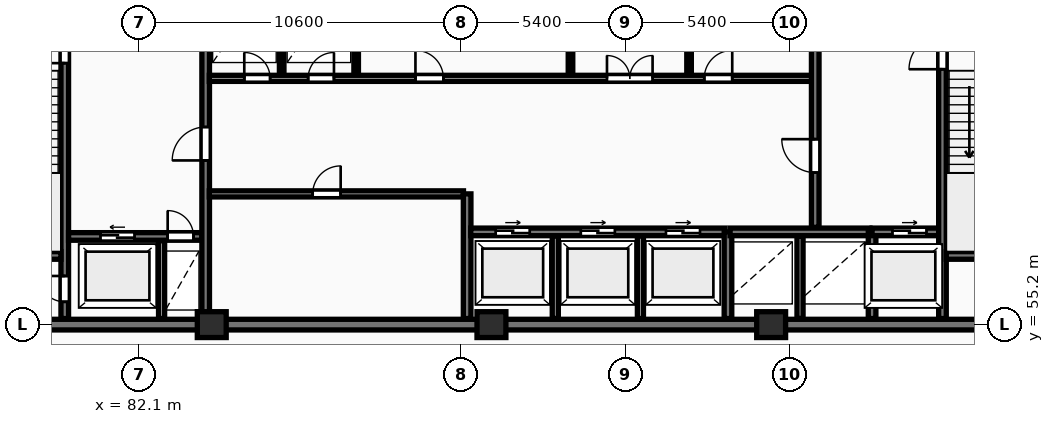
"""IFC4 building model, lengths in metres.
Left out: names, types, materials, properties, quantities, classifications, styles, units other than length and angle.
Written with IfcOpenShell. Run it as: python <this file> out.ifc"""

import sys

from ifc_helpers import new_model, si_unit, direction, frame, frame_2d, origin, origin_2d, place, context, subcontext, project, spatial, rectangle, extrude, element, fill, save


model = new_model("IFC4")
c1 = context("Model", 3, precision=1e-05, world=origin(), true_north=direction((0.0, 1.0)))
c2 = subcontext(c1, "Body", "Model", "MODEL_VIEW")
j1 = project(units=[si_unit("LENGTHUNIT", "METRE"), si_unit("PLANEANGLEUNIT", "RADIAN")], contexts=[c1])
p1 = place(None, origin())
s1 = spatial("IfcSite", under=j1, at=p1, CompositionType="ELEMENT")
p2 = place(p1, origin())
s2 = spatial("IfcBuilding", under=s1, at=p2, CompositionType="ELEMENT")
p3 = place(p2, frame((0.0, 0.0, 157.3)))
s3 = spatial("IfcBuildingStorey", under=s2, at=p3, CompositionType="ELEMENT", Elevation=157.3)
for number, where, z_axis, x_axis in (
    (1, (84.5, 55.2, 0.0), (0.0, 0.0, 1.0), (1.0, 0.0, 0.0)),
    (2, (93.7, 55.2, 0.0), (0.0, 0.0, 1.0), (1.0, 0.0, 0.0)),
    (3, (102.9, 55.2, 0.0), (0.0, 0.0, 1.0), (1.0, 0.0, 0.0)),
):
    element("IfcColumn", number, at=place(p3, frame(where, z_axis=z_axis, x_axis=x_axis)), inside=s3, PredefinedType="COLUMN", context=c2, shape_type="SweptSolid", body=[
        extrude(rectangle(XDim=0.95, YDim=0.85, at=origin_2d()), origin(), (0.0, 0.0, 1.0), 4.8),
    ])
p4 = place(p3, frame((75.95, 55.2, 0.0), z_axis=(0.0, 0.0, 1.0), x_axis=(1.0, 0.0, 0.0)))
e4 = element("IfcWall", 4, at=p4, inside=s3, PredefinedType="SHEAR", context=c2, shape_type="SweptSolid", body=[
    extrude(rectangle(XDim=36.3, YDim=0.35, at=frame_2d((18.15, 0.0))), origin(), (0.0, 0.0, 1.0), 4.8),
])
p5 = place(p3, frame((79.665, 55.4, 0.0), z_axis=(0.0, 0.0, 1.0), x_axis=(0.0, 1.0, 0.0)))
e5 = element("IfcWall", 5, at=p5, inside=s3, PredefinedType="SHEAR", context=c2, shape_type="SweptSolid", body=[
    extrude(rectangle(XDim=11.6, YDim=0.25, at=frame_2d((5.8, 0.0))), origin(), (0.0, 0.0, 1.0), 4.8),
])
p6 = place(p5, frame((0.55, 0.0, 0.0)))
e6 = element("IfcOpeningElement", 6, at=p6, cuts=e5, PredefinedType="OPENING", context=c2, shape_type="SweptSolid", body=[
    extrude(rectangle(XDim=0.85, YDim=2.05, at=frame_2d((0.425, 1.025))), frame((0.0, 0.135, 0.0), z_axis=(0.0, -1.0, 0.0), x_axis=(1.0, 0.0, 0.0)), (0.0, 0.0, 1.0), 0.27),
])
p7 = place(p5, frame((8.4, 0.0, 0.0)))
e7 = element("IfcOpeningElement", 7, at=p7, cuts=e5, PredefinedType="OPENING", context=c2, shape_type="SweptSolid", body=[
    extrude(rectangle(XDim=1.1, YDim=2.1, at=frame_2d((0.55, 1.05))), frame((0.0, 0.135, 0.0), z_axis=(0.0, -1.0, 0.0), x_axis=(1.0, 0.0, 0.0)), (0.0, 0.0, 1.0), 0.27),
])
p8 = place(p5, frame((10.25, 0.0, 0.0)))
e8 = element("IfcOpeningElement", 8, at=p8, cuts=e5, PredefinedType="OPENING", context=c2, shape_type="SweptSolid", body=[
    extrude(rectangle(XDim=0.85, YDim=2.05, at=frame_2d((0.425, 1.025))), frame((0.0, 0.135, 0.0), z_axis=(0.0, -1.0, 0.0), x_axis=(1.0, 0.0, 0.0)), (0.0, 0.0, 1.0), 0.27),
])
p9 = place(p3, frame((76.3, 57.475, 0.0), z_axis=(0.0, 0.0, 1.0), x_axis=(1.0, 0.0, 0.0)))
e9 = element("IfcWall", 9, at=p9, inside=s3, PredefinedType="SHEAR", context=c2, shape_type="SweptSolid", body=[
    extrude(rectangle(XDim=3.24, YDim=0.25, at=frame_2d((1.62, 0.0))), origin(), (0.0, 0.0, 1.0), 4.8),
])
p10 = place(p3, frame((79.79, 58.1, 0.0), z_axis=(0.0, 0.0, 1.0), x_axis=(1.0, 0.0, 0.0)))
e10 = element("IfcWall", 10, at=p10, inside=s3, PredefinedType="SHEAR", context=c2, shape_type="SweptSolid", body=[
    extrude(rectangle(XDim=4.39, YDim=0.25, at=frame_2d((2.195, 0.0))), origin(), (0.0, 0.0, 1.0), 4.8),
])
p11 = place(p10, frame((1.05, 0.0, 0.0)))
e11 = element("IfcOpeningElement", 11, at=p11, cuts=e10, PredefinedType="OPENING", context=c2, shape_type="SweptSolid", body=[
    extrude(rectangle(XDim=1.12, YDim=2.12, at=frame_2d((0.56, 1.06))), frame((0.0, 0.135, 0.0), z_axis=(0.0, -1.0, 0.0), x_axis=(1.0, 0.0, 0.0)), (0.0, 0.0, 1.0), 0.27),
])
p12 = place(p10, frame((3.26, 0.0, 0.0)))
e12 = element("IfcOpeningElement", 12, at=p12, cuts=e10, PredefinedType="OPENING", context=c2, shape_type="SweptSolid", body=[
    extrude(rectangle(XDim=0.85, YDim=2.05, at=frame_2d((0.425, 1.025))), frame((0.0, 0.135, 0.0), z_axis=(0.0, -1.0, 0.0), x_axis=(1.0, 0.0, 0.0)), (0.0, 0.0, 1.0), 0.27),
])
p13 = place(p3, frame((82.85, 55.4, 0.0), z_axis=(0.0, 0.0, 1.0), x_axis=(0.0, 1.0, 0.0)))
e13 = element("IfcWall", 13, at=p13, inside=s3, PredefinedType="PARTITIONING", context=c2, shape_type="SweptSolid", body=[
    extrude(rectangle(XDim=2.56, YDim=0.2, at=frame_2d((1.28, 0.0))), origin(), (0.0, 0.0, 1.0), 4.48),
])
p14 = place(p3, frame((84.3, 55.4, 0.0), z_axis=(0.0, 0.0, 1.0), x_axis=(0.0, 1.0, 0.0)))
e14 = element("IfcWall", 14, at=p14, inside=s3, PredefinedType="SHEAR", context=c2, shape_type="SweptSolid", body=[
    extrude(rectangle(XDim=11.6, YDim=0.25, at=frame_2d((5.8, 0.0))), origin(), (0.0, 0.0, 1.0), 4.8),
])
p15 = place(p14, frame((5.2, 0.0, 0.0)))
e15 = element("IfcOpeningElement", 15, at=p15, cuts=e14, PredefinedType="OPENING", context=c2, shape_type="SweptSolid", body=[
    extrude(rectangle(XDim=1.1, YDim=2.1, at=frame_2d((0.55, 1.05))), frame((0.0, 0.135, 0.0), z_axis=(0.0, -1.0, 0.0), x_axis=(1.0, 0.0, 0.0)), (0.0, 0.0, 1.0), 0.27),
])
p16 = place(p3, frame((84.42, 59.5, 0.0), z_axis=(0.0, 0.0, 1.0), x_axis=(1.0, 0.0, 0.0)))
e16 = element("IfcWall", 16, at=p16, inside=s3, PredefinedType="PARTITIONING", context=c2, shape_type="SweptSolid", body=[
    extrude(rectangle(XDim=8.36, YDim=0.2, at=frame_2d((4.18, 0.0))), origin(), (0.0, 0.0, 1.0), 4.48),
])
p17 = place(p16, frame((3.4, 0.0, 0.0)))
e17 = element("IfcOpeningElement", 17, at=p17, cuts=e16, PredefinedType="OPENING", context=c2, shape_type="SweptSolid", body=[
    extrude(rectangle(XDim=0.92, YDim=2.08, at=frame_2d((0.46, 1.04))), frame((0.0, 0.11, 0.0), z_axis=(0.0, -1.0, 0.0), x_axis=(1.0, 0.0, 0.0)), (0.0, 0.0, 1.0), 0.22),
])
p18 = place(p3, frame((92.9, 55.4, 0.0), z_axis=(0.0, 0.0, 1.0), x_axis=(0.0, 1.0, 0.0)))
e18 = element("IfcWall", 18, at=p18, inside=s3, PredefinedType="SHEAR", context=c2, shape_type="SweptSolid", body=[
    extrude(rectangle(XDim=4.1, YDim=0.25, at=frame_2d((2.05, 0.0))), origin(), (0.0, 0.0, 1.0), 4.8),
])
for number, where, z_axis, x_axis in (
    (19, (95.8, 55.4, 0.0), (0.0, 0.0, 1.0), (0.0, 1.0, 0.0)),
    (20, (98.6, 55.4, 0.0), (0.0, 0.0, 1.0), (0.0, 1.0, 0.0)),
):
    element("IfcWall", number, at=place(p3, frame(where, z_axis=z_axis, x_axis=x_axis)), inside=s3, PredefinedType="PARTITIONING", context=c2, shape_type="SweptSolid", body=[
        extrude(rectangle(XDim=2.72, YDim=0.2, at=frame_2d((1.36, 0.0))), origin(), (0.0, 0.0, 1.0), 4.48),
    ])
p19 = place(p3, frame((93.02, 58.25, 0.0), z_axis=(0.0, 0.0, 1.0), x_axis=(1.0, 0.0, 0.0)))
e21 = element("IfcWall", 21, at=p19, inside=s3, PredefinedType="SHEAR", context=c2, shape_type="SweptSolid", body=[
    extrude(rectangle(XDim=8.36, YDim=0.25, at=frame_2d((4.18, 0.0))), origin(), (0.0, 0.0, 1.0), 4.8),
])
p20 = place(p19, frame((0.82, 0.0, 0.0)))
e22 = element("IfcOpeningElement", 22, at=p20, cuts=e21, PredefinedType="OPENING", context=c2, shape_type="SweptSolid", body=[
    extrude(rectangle(XDim=1.12, YDim=2.12, at=frame_2d((0.56, 1.06))), frame((0.0, 0.135, 0.0), z_axis=(0.0, -1.0, 0.0), x_axis=(1.0, 0.0, 0.0)), (0.0, 0.0, 1.0), 0.27),
])
p21 = place(p19, frame((3.62, 0.0, 0.0)))
e23 = element("IfcOpeningElement", 23, at=p21, cuts=e21, PredefinedType="OPENING", context=c2, shape_type="SweptSolid", body=[
    extrude(rectangle(XDim=1.12, YDim=2.12, at=frame_2d((0.56, 1.06))), frame((0.0, 0.135, 0.0), z_axis=(0.0, -1.0, 0.0), x_axis=(1.0, 0.0, 0.0)), (0.0, 0.0, 1.0), 0.27),
])
p22 = place(p19, frame((6.42, 0.0, 0.0)))
e24 = element("IfcOpeningElement", 24, at=p22, cuts=e21, PredefinedType="OPENING", context=c2, shape_type="SweptSolid", body=[
    extrude(rectangle(XDim=1.12, YDim=2.12, at=frame_2d((0.56, 1.06))), frame((0.0, 0.135, 0.0), z_axis=(0.0, -1.0, 0.0), x_axis=(1.0, 0.0, 0.0)), (0.0, 0.0, 1.0), 0.27),
])
p23 = place(p3, frame((101.48, 55.4, 0.0), z_axis=(0.0, 0.0, 1.0), x_axis=(0.0, 1.0, 0.0)))
e25 = element("IfcWall", 25, at=p23, inside=s3, PredefinedType="SHEAR", context=c2, shape_type="SweptSolid", body=[
    extrude(rectangle(XDim=2.85, YDim=0.25, at=frame_2d((1.425, 0.0))), origin(), (0.0, 0.0, 1.0), 4.8),
])
p24 = place(p3, frame((103.85, 55.4, 0.0), z_axis=(0.0, 0.0, 1.0), x_axis=(0.0, 1.0, 0.0)))
e26 = element("IfcWall", 26, at=p24, inside=s3, PredefinedType="PARTITIONING", context=c2, shape_type="SweptSolid", body=[
    extrude(rectangle(XDim=2.72, YDim=0.2, at=frame_2d((1.36, 0.0))), origin(), (0.0, 0.0, 1.0), 4.48),
])
p25 = place(p3, frame((101.55, 58.25, 0.0), z_axis=(0.0, 0.0, 1.0), x_axis=(1.0, 0.0, 0.0)))
e27 = element("IfcWall", 27, at=p25, inside=s3, PredefinedType="SHEAR", context=c2, shape_type="SweptSolid", body=[
    extrude(rectangle(XDim=4.6, YDim=0.25, at=frame_2d((2.3, 0.0))), origin(), (0.0, 0.0, 1.0), 4.8),
])
p26 = place(p3, frame((106.22, 55.4, 0.0), z_axis=(0.0, 0.0, 1.0), x_axis=(0.0, 1.0, 0.0)))
e28 = element("IfcWall", 28, at=p26, inside=s3, PredefinedType="SHEAR", context=c2, shape_type="SweptSolid", body=[
    extrude(rectangle(XDim=2.85, YDim=0.25, at=frame_2d((1.425, 0.0))), origin(), (0.0, 0.0, 1.0), 4.8),
])
p27 = place(p3, frame((106.22, 58.25, 0.0), z_axis=(0.0, 0.0, 1.0), x_axis=(1.0, 0.0, 0.0)))
e29 = element("IfcWall", 29, at=p27, inside=s3, PredefinedType="SHEAR", context=c2, shape_type="SweptSolid", body=[
    extrude(rectangle(XDim=2.46, YDim=0.25, at=frame_2d((1.23, 0.0))), origin(), (0.0, 0.0, 1.0), 4.8),
])
p28 = place(p27, frame((0.67, 0.0, 0.0)))
e30 = element("IfcOpeningElement", 30, at=p28, cuts=e29, PredefinedType="OPENING", context=c2, shape_type="SweptSolid", body=[
    extrude(rectangle(XDim=1.12, YDim=2.12, at=frame_2d((0.56, 1.06))), frame((0.0, 0.135, 0.0), z_axis=(0.0, -1.0, 0.0), x_axis=(1.0, 0.0, 0.0)), (0.0, 0.0, 1.0), 0.27),
])
for number, where, z_axis, x_axis in (
    (31, (86.8, 63.4, 0.0), (0.0, 0.0, 1.0), (0.0, 1.0, 0.0)),
    (32, (89.25, 63.4, 0.0), (0.0, 0.0, 1.0), (0.0, 1.0, 0.0)),
    (33, (96.3, 63.4, 0.0), (0.0, 0.0, 1.0), (0.0, 1.0, 0.0)),
    (34, (100.2, 63.4, 0.0), (0.0, 0.0, 1.0), (0.0, 1.0, 0.0)),
):
    element("IfcWall", number, at=place(p3, frame(where, z_axis=z_axis, x_axis=x_axis)), inside=s3, PredefinedType="PARTITIONING", context=c2, shape_type="SweptSolid", body=[
        extrude(rectangle(XDim=3.6, YDim=0.15, at=frame_2d((1.8, 0.0))), origin(), (0.0, 0.0, 1.0), 4.48),
    ])
p29 = place(p3, frame((84.42, 63.3, 0.0), z_axis=(0.0, 0.0, 1.0), x_axis=(1.0, 0.0, 0.0)))
e35 = element("IfcWall", 35, at=p29, inside=s3, PredefinedType="PARTITIONING", context=c2, shape_type="SweptSolid", body=[
    extrude(rectangle(XDim=19.83, YDim=0.2, at=frame_2d((9.915, 0.0))), origin(), (0.0, 0.0, 1.0), 4.48),
])
p30 = place(p29, frame((1.15, 0.0, 0.0)))
e36 = element("IfcOpeningElement", 36, at=p30, cuts=e35, PredefinedType="OPENING", context=c2, shape_type="SweptSolid", body=[
    extrude(rectangle(XDim=0.85, YDim=2.05, at=frame_2d((0.425, 1.025))), frame((0.0, 0.11, 0.0), z_axis=(0.0, -1.0, 0.0), x_axis=(1.0, 0.0, 0.0)), (0.0, 0.0, 1.0), 0.22),
])
p31 = place(p29, frame((3.25, 0.0, 0.0)))
e37 = element("IfcOpeningElement", 37, at=p31, cuts=e35, PredefinedType="OPENING", context=c2, shape_type="SweptSolid", body=[
    extrude(rectangle(XDim=0.85, YDim=2.05, at=frame_2d((0.425, 1.025))), frame((0.0, 0.11, 0.0), z_axis=(0.0, -1.0, 0.0), x_axis=(1.0, 0.0, 0.0)), (0.0, 0.0, 1.0), 0.22),
])
p32 = place(p29, frame((13.08, 0.0, 0.0)))
e38 = element("IfcOpeningElement", 38, at=p32, cuts=e35, PredefinedType="OPENING", context=c2, shape_type="SweptSolid", body=[
    extrude(rectangle(XDim=1.5, YDim=2.2, at=frame_2d((0.75, 1.1))), frame((0.0, 0.11, 0.0), z_axis=(0.0, -1.0, 0.0), x_axis=(1.0, 0.0, 0.0)), (0.0, 0.0, 1.0), 0.22),
])
p33 = place(p29, frame((6.78, 0.0, 0.0)))
e39 = element("IfcOpeningElement", 39, at=p33, cuts=e35, PredefinedType="OPENING", context=c2, shape_type="SweptSolid", body=[
    extrude(rectangle(XDim=0.92, YDim=2.08, at=frame_2d((0.46, 1.04))), frame((0.0, 0.11, 0.0), z_axis=(0.0, -1.0, 0.0), x_axis=(1.0, 0.0, 0.0)), (0.0, 0.0, 1.0), 0.22),
])
p34 = place(p29, frame((16.28, 0.0, 0.0)))
e40 = element("IfcOpeningElement", 40, at=p34, cuts=e35, PredefinedType="OPENING", context=c2, shape_type="SweptSolid", body=[
    extrude(rectangle(XDim=0.92, YDim=2.08, at=frame_2d((0.46, 1.04))), frame((0.0, 0.11, 0.0), z_axis=(0.0, -1.0, 0.0), x_axis=(1.0, 0.0, 0.0)), (0.0, 0.0, 1.0), 0.22),
])
p35 = place(p3, frame((104.35, 58.4, 0.0), z_axis=(0.0, 0.0, 1.0), x_axis=(0.0, 1.0, 0.0)))
e41 = element("IfcWall", 41, at=p35, inside=s3, PredefinedType="SHEAR", context=c2, shape_type="SweptSolid", body=[
    extrude(rectangle(XDim=8.6, YDim=0.25, at=frame_2d((4.3, 0.0))), origin(), (0.0, 0.0, 1.0), 4.8),
])
p36 = place(p35, frame((1.8, 0.0, 0.0)))
e42 = element("IfcOpeningElement", 42, at=p36, cuts=e41, PredefinedType="OPENING", context=c2, shape_type="SweptSolid", body=[
    extrude(rectangle(XDim=1.1, YDim=2.1, at=frame_2d((0.55, 1.05))), frame((0.0, 0.135, 0.0), z_axis=(0.0, -1.0, 0.0), x_axis=(1.0, 0.0, 0.0)), (0.0, 0.0, 1.0), 0.27),
])
p37 = place(p3, frame((108.535, 55.4, 0.0), z_axis=(0.0, 0.0, 1.0), x_axis=(0.0, 1.0, 0.0)))
e43 = element("IfcWall", 43, at=p37, inside=s3, PredefinedType="SHEAR", context=c2, shape_type="SweptSolid", body=[
    extrude(rectangle(XDim=11.6, YDim=0.25, at=frame_2d((5.8, 0.0))), origin(), (0.0, 0.0, 1.0), 4.8),
])
p38 = place(p37, frame((8.2, 0.0, 0.0)))
e44 = element("IfcOpeningElement", 44, at=p38, cuts=e43, PredefinedType="OPENING", context=c2, shape_type="SweptSolid", body=[
    extrude(rectangle(XDim=1.1, YDim=2.1, at=frame_2d((0.55, 1.05))), frame((0.0, 0.135, 0.0), z_axis=(0.0, -1.0, 0.0), x_axis=(1.0, 0.0, 0.0)), (0.0, 0.0, 1.0), 0.27),
])
p39 = place(p37, frame((10.25, 0.0, 0.0)))
e45 = element("IfcOpeningElement", 45, at=p39, cuts=e43, PredefinedType="OPENING", context=c2, shape_type="SweptSolid", body=[
    extrude(rectangle(XDim=0.85, YDim=2.05, at=frame_2d((0.425, 1.025))), frame((0.0, 0.135, 0.0), z_axis=(0.0, -1.0, 0.0), x_axis=(1.0, 0.0, 0.0)), (0.0, 0.0, 1.0), 0.27),
])
p40 = place(p3, frame((108.66, 57.475, 0.0), z_axis=(0.0, 0.0, 1.0), x_axis=(1.0, 0.0, 0.0)))
e46 = element("IfcWall", 46, at=p40, inside=s3, PredefinedType="SHEAR", context=c2, shape_type="SweptSolid", body=[
    extrude(rectangle(XDim=3.24, YDim=0.25, at=frame_2d((1.62, 0.0))), origin(), (0.0, 0.0, 1.0), 4.8),
])
p41 = place(p6, origin())
e47 = element("IfcDoor", 47, at=p41, inside=s3, OperationType="SINGLE_SWING_RIGHT", PredefinedType="DOOR", context=c2, shape_type="SweptSolid", body=[
    extrude(rectangle(XDim=0.85, YDim=2.05, at=frame_2d((0.425, 1.025))), frame((0.0, 0.025, 0.0), z_axis=(0.0, -1.0, 0.0), x_axis=(1.0, 0.0, 0.0)), (0.0, 0.0, 1.0), 0.05),
])
fill(e6, e47)
p42 = place(p7, origin())
e48 = element("IfcDoor", 48, at=p42, inside=s3, OperationType="SINGLE_SWING_LEFT", PredefinedType="DOOR", context=c2, shape_type="SweptSolid", body=[
    extrude(rectangle(XDim=1.1, YDim=2.1, at=frame_2d((0.55, 1.05))), frame((0.0, 0.025, 0.0), z_axis=(0.0, -1.0, 0.0), x_axis=(1.0, 0.0, 0.0)), (0.0, 0.0, 1.0), 0.05),
])
fill(e7, e48)
p43 = place(p11, origin())
e49 = element("IfcDoor", 49, at=p43, inside=s3, OperationType="SLIDING_TO_LEFT", PredefinedType="DOOR", context=c2, shape_type="SweptSolid", body=[
    extrude(rectangle(XDim=1.12, YDim=2.12, at=frame_2d((0.56, 1.06))), frame((0.0, 0.025, 0.0), z_axis=(0.0, -1.0, 0.0), x_axis=(1.0, 0.0, 0.0)), (0.0, 0.0, 1.0), 0.05),
])
fill(e11, e49)
p44 = place(p12, origin())
e50 = element("IfcDoor", 50, at=p44, inside=s3, OperationType="SINGLE_SWING_LEFT", PredefinedType="DOOR", context=c2, shape_type="SweptSolid", body=[
    extrude(rectangle(XDim=0.85, YDim=2.05, at=frame_2d((0.425, 1.025))), frame((0.0, 0.025, 0.0), z_axis=(0.0, -1.0, 0.0), x_axis=(1.0, 0.0, 0.0)), (0.0, 0.0, 1.0), 0.05),
])
fill(e12, e50)
p45 = place(p15, origin())
e51 = element("IfcDoor", 51, at=p45, inside=s3, OperationType="SINGLE_SWING_LEFT", PredefinedType="DOOR", context=c2, shape_type="SweptSolid", body=[
    extrude(rectangle(XDim=1.1, YDim=2.1, at=frame_2d((0.55, 1.05))), frame((0.0, 0.025, 0.0), z_axis=(0.0, -1.0, 0.0), x_axis=(1.0, 0.0, 0.0)), (0.0, 0.0, 1.0), 0.05),
])
fill(e15, e51)
p46 = place(p17, origin())
e52 = element("IfcDoor", 52, at=p46, inside=s3, OperationType="SINGLE_SWING_RIGHT", PredefinedType="DOOR", context=c2, shape_type="SweptSolid", body=[
    extrude(rectangle(XDim=0.92, YDim=2.08, at=frame_2d((0.46, 1.04))), frame((0.0, 0.025, 0.0), z_axis=(0.0, -1.0, 0.0), x_axis=(1.0, 0.0, 0.0)), (0.0, 0.0, 1.0), 0.05),
])
fill(e17, e52)
p47 = place(p20, origin())
e53 = element("IfcDoor", 53, at=p47, inside=s3, OperationType="SLIDING_TO_RIGHT", PredefinedType="DOOR", context=c2, shape_type="SweptSolid", body=[
    extrude(rectangle(XDim=1.12, YDim=2.12, at=frame_2d((0.56, 1.06))), frame((0.0, 0.025, 0.0), z_axis=(0.0, -1.0, 0.0), x_axis=(1.0, 0.0, 0.0)), (0.0, 0.0, 1.0), 0.05),
])
fill(e22, e53)
p48 = place(p21, origin())
e54 = element("IfcDoor", 54, at=p48, inside=s3, OperationType="SLIDING_TO_RIGHT", PredefinedType="DOOR", context=c2, shape_type="SweptSolid", body=[
    extrude(rectangle(XDim=1.12, YDim=2.12, at=frame_2d((0.56, 1.06))), frame((0.0, 0.025, 0.0), z_axis=(0.0, -1.0, 0.0), x_axis=(1.0, 0.0, 0.0)), (0.0, 0.0, 1.0), 0.05),
])
fill(e23, e54)
p49 = place(p22, origin())
e55 = element("IfcDoor", 55, at=p49, inside=s3, OperationType="SLIDING_TO_RIGHT", PredefinedType="DOOR", context=c2, shape_type="SweptSolid", body=[
    extrude(rectangle(XDim=1.12, YDim=2.12, at=frame_2d((0.56, 1.06))), frame((0.0, 0.025, 0.0), z_axis=(0.0, -1.0, 0.0), x_axis=(1.0, 0.0, 0.0)), (0.0, 0.0, 1.0), 0.05),
])
fill(e24, e55)
p50 = place(p28, origin())
e56 = element("IfcDoor", 56, at=p50, inside=s3, OperationType="SLIDING_TO_RIGHT", PredefinedType="DOOR", context=c2, shape_type="SweptSolid", body=[
    extrude(rectangle(XDim=1.12, YDim=2.12, at=frame_2d((0.56, 1.06))), frame((0.0, 0.025, 0.0), z_axis=(0.0, -1.0, 0.0), x_axis=(1.0, 0.0, 0.0)), (0.0, 0.0, 1.0), 0.05),
])
fill(e30, e56)
p51 = place(p30, origin())
e57 = element("IfcDoor", 57, at=p51, inside=s3, OperationType="SINGLE_SWING_LEFT", PredefinedType="DOOR", context=c2, shape_type="SweptSolid", body=[
    extrude(rectangle(XDim=0.85, YDim=2.05, at=frame_2d((0.425, 1.025))), frame((0.0, 0.025, 0.0), z_axis=(0.0, -1.0, 0.0), x_axis=(1.0, 0.0, 0.0)), (0.0, 0.0, 1.0), 0.05),
])
fill(e36, e57)
p52 = place(p31, origin())
e58 = element("IfcDoor", 58, at=p52, inside=s3, OperationType="SINGLE_SWING_RIGHT", PredefinedType="DOOR", context=c2, shape_type="SweptSolid", body=[
    extrude(rectangle(XDim=0.85, YDim=2.05, at=frame_2d((0.425, 1.025))), frame((0.0, 0.025, 0.0), z_axis=(0.0, -1.0, 0.0), x_axis=(1.0, 0.0, 0.0)), (0.0, 0.0, 1.0), 0.05),
])
fill(e37, e58)
p53 = place(p32, origin())
e59 = element("IfcDoor", 59, at=p53, inside=s3, OperationType="DOUBLE_DOOR_SINGLE_SWING", PredefinedType="DOOR", context=c2, shape_type="SweptSolid", body=[
    extrude(rectangle(XDim=1.5, YDim=2.2, at=frame_2d((0.75, 1.1))), frame((0.0, 0.025, 0.0), z_axis=(0.0, -1.0, 0.0), x_axis=(1.0, 0.0, 0.0)), (0.0, 0.0, 1.0), 0.05),
])
fill(e38, e59)
p54 = place(p33, origin())
e60 = element("IfcDoor", 60, at=p54, inside=s3, OperationType="SINGLE_SWING_LEFT", PredefinedType="DOOR", context=c2, shape_type="SweptSolid", body=[
    extrude(rectangle(XDim=0.92, YDim=2.08, at=frame_2d((0.46, 1.04))), frame((0.0, 0.025, 0.0), z_axis=(0.0, -1.0, 0.0), x_axis=(1.0, 0.0, 0.0)), (0.0, 0.0, 1.0), 0.05),
])
fill(e39, e60)
p55 = place(p34, origin())
e61 = element("IfcDoor", 61, at=p55, inside=s3, OperationType="SINGLE_SWING_RIGHT", PredefinedType="DOOR", context=c2, shape_type="SweptSolid", body=[
    extrude(rectangle(XDim=0.92, YDim=2.08, at=frame_2d((0.46, 1.04))), frame((0.0, 0.025, 0.0), z_axis=(0.0, -1.0, 0.0), x_axis=(1.0, 0.0, 0.0)), (0.0, 0.0, 1.0), 0.05),
])
fill(e40, e61)
p56 = place(p36, origin())
e62 = element("IfcDoor", 62, at=p56, inside=s3, OperationType="SINGLE_SWING_RIGHT", PredefinedType="DOOR", context=c2, shape_type="SweptSolid", body=[
    extrude(rectangle(XDim=1.1, YDim=2.1, at=frame_2d((0.55, 1.05))), frame((0.0, 0.025, 0.0), z_axis=(0.0, -1.0, 0.0), x_axis=(1.0, 0.0, 0.0)), (0.0, 0.0, 1.0), 0.05),
])
fill(e42, e62)
p57 = place(p38, origin())
e63 = element("IfcDoor", 63, at=p57, inside=s3, OperationType="SINGLE_SWING_LEFT", PredefinedType="DOOR", context=c2, shape_type="SweptSolid", body=[
    extrude(rectangle(XDim=1.1, YDim=2.1, at=frame_2d((0.55, 1.05))), frame((0.0, 0.025, 0.0), z_axis=(0.0, -1.0, 0.0), x_axis=(1.0, 0.0, 0.0)), (0.0, 0.0, 1.0), 0.05),
])
fill(e44, e63)
save(model, sys.argv[1])
